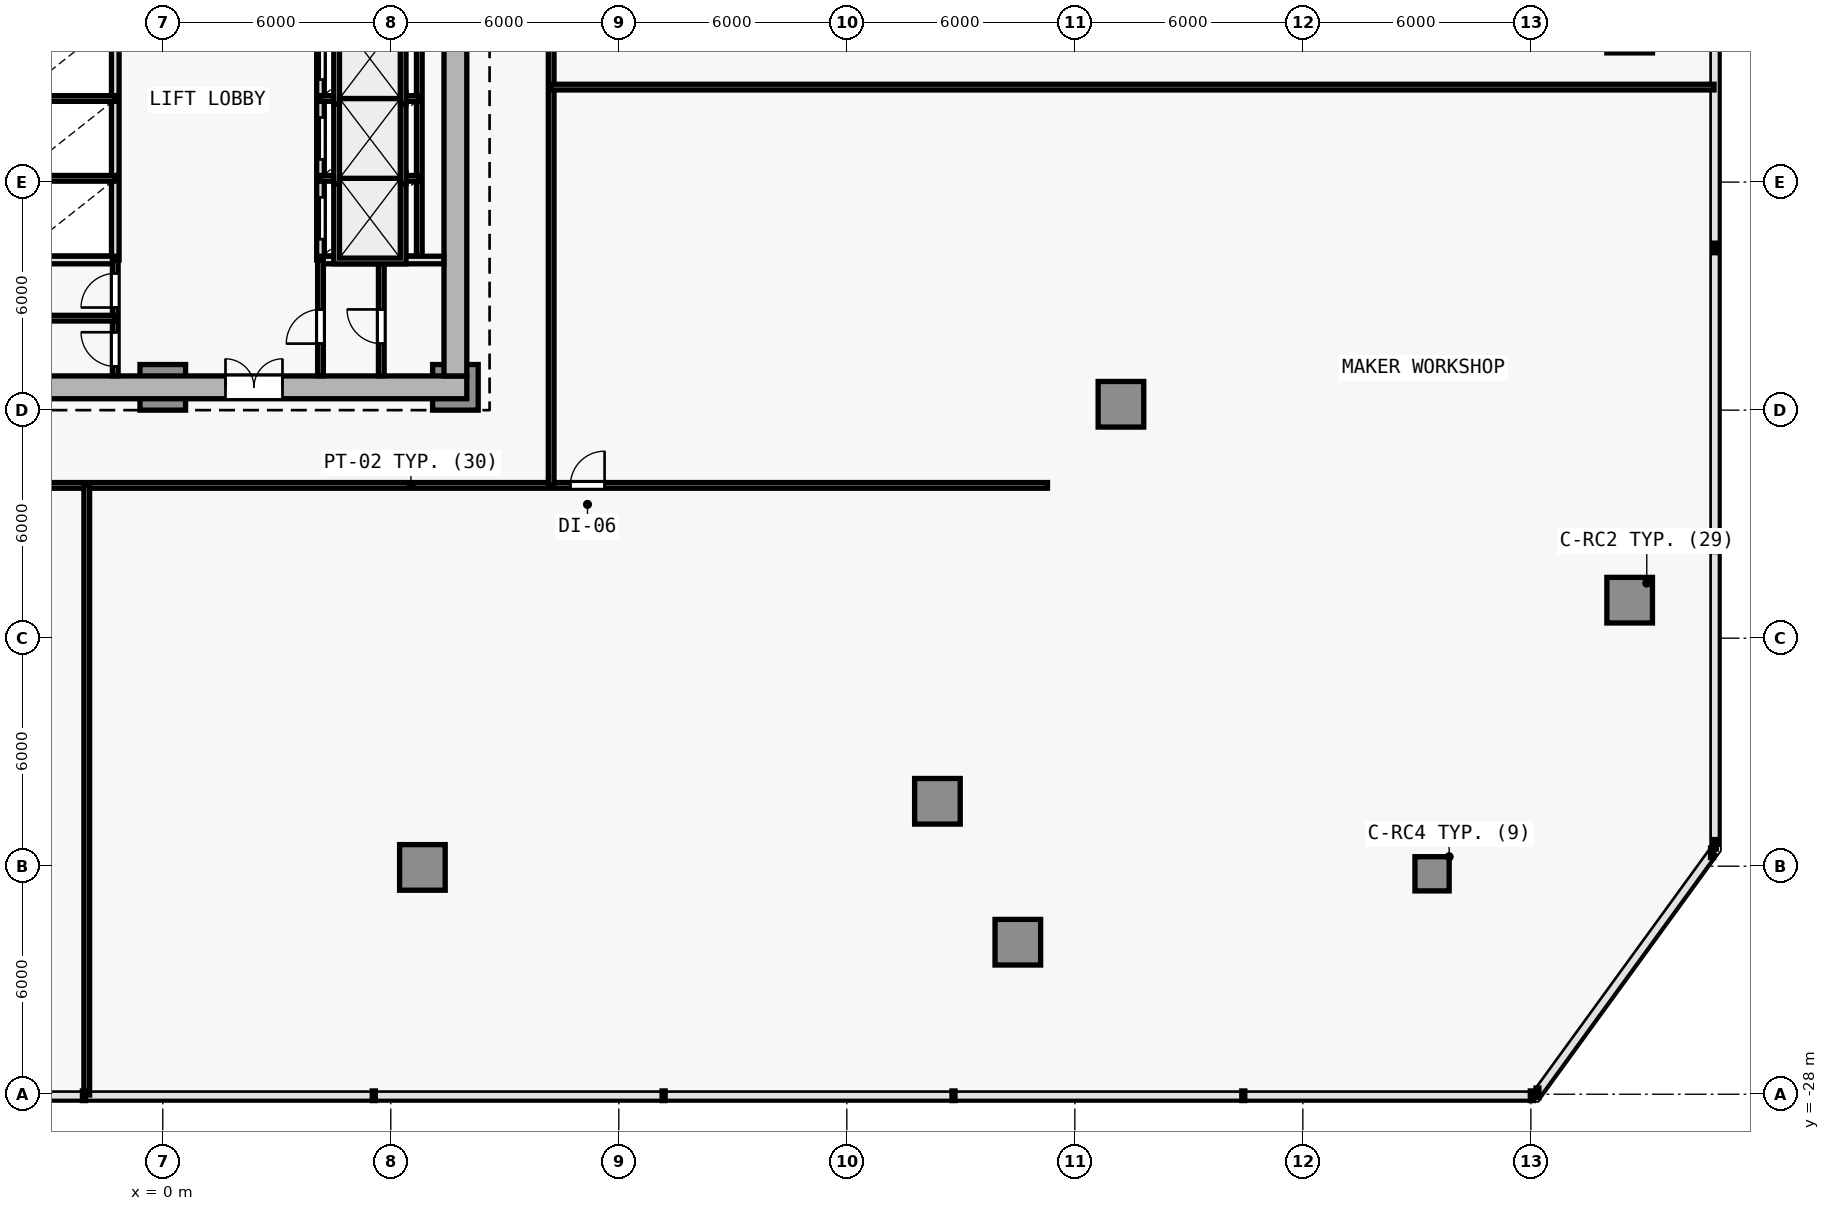
"""IFC4 building model, lengths in metres.
Left out: names, types, materials, properties, quantities, classifications, styles, units other than length and angle.
Written with IfcOpenShell. Run it as: python <this file> out.ifc"""

import sys

from ifc_helpers import new_model, si_unit, direction, frame, frame_2d, origin, origin_2d, place, context, subcontext, project, spatial, rectangle, extrude, element, fill, save


model = new_model("IFC4")
c1 = context("Model", 3, precision=1e-05, world=origin(), true_north=direction((0.0, 1.0)))
c2 = subcontext(c1, "Body", "Model", "MODEL_VIEW")
j1 = project(units=[si_unit("LENGTHUNIT", "METRE"), si_unit("PLANEANGLEUNIT", "RADIAN")], contexts=[c1])
p1 = place(None, origin())
s1 = spatial("IfcSite", under=j1, at=p1, CompositionType="ELEMENT")
p2 = place(p1, origin())
s2 = spatial("IfcBuilding", under=s1, at=p2, CompositionType="ELEMENT")
p3 = place(p2, frame((0.0, 0.0, 5.0)))
s3 = spatial("IfcBuildingStorey", under=s2, at=p3, CompositionType="ELEMENT", Elevation=5.0)
for number, where, z_axis, x_axis in (
    (1, (7.7, -9.4, 0.0), (0.0, 0.0, 1.0), (1.0, 0.0, 0.0)),
    (2, (0.0, -9.4, 0.0), (0.0, 0.0, 1.0), (1.0, 0.0, 0.0)),
    (3, (38.6, -15.0, 0.0), (0.0, 0.0, 1.0), (1.0, 0.0, 0.0)),
    (4, (38.6, 0.0, 0.0), (0.0, 0.0, 1.0), (1.0, 0.0, 0.0)),
    (5, (22.5, -24.0, 0.0), (0.0, 0.0, 1.0), (1.0, 0.0, 0.0)),
    (6, (6.832, -22.032, 0.0), (0.0, 0.0, 1.0), (1.0, 0.0, 0.0)),
    (7, (20.384, -20.292, 0.0), (0.0, 0.0, 1.0), (1.0, 0.0, 0.0)),
    (8, (25.213, -9.845, 0.0), (0.0, 0.0, 1.0), (1.0, 0.0, 0.0)),
):
    element("IfcColumn", number, at=place(p3, frame(where, z_axis=z_axis, x_axis=x_axis)), inside=s3, PredefinedType="COLUMN", context=c2, shape_type="SweptSolid", body=[
        extrude(rectangle(XDim=1.2, YDim=1.2, at=origin_2d()), origin(), (0.0, 0.0, 1.0), 4.2),
    ])
p4 = place(p3, frame((33.4, -22.2, 0.0), z_axis=(0.0, 0.0, 1.0), x_axis=(1.0, 0.0, 0.0)))
e9 = element("IfcColumn", 9, at=p4, inside=s3, PredefinedType="COLUMN", context=c2, shape_type="SweptSolid", body=[
    extrude(rectangle(XDim=0.9, YDim=0.9, at=origin_2d()), origin(), (0.0, 0.0, 1.0), 4.2),
])
p5 = place(p3, frame((-8.0, -9.4, 0.0), z_axis=(0.0, 0.0, 1.0), x_axis=(1.0, 0.0, 0.0)))
e10 = element("IfcWall", 10, at=p5, inside=s3, PredefinedType="SHEAR", context=c2, shape_type="SweptSolid", body=[
    extrude(rectangle(XDim=16.0, YDim=0.6, at=frame_2d((8.0, 0.0))), origin(), (0.0, 0.0, 1.0), 3.92),
])
p6 = place(p5, frame((9.65, 0.0, 0.0)))
e11 = element("IfcOpeningElement", 11, at=p6, cuts=e10, PredefinedType="OPENING", context=c2, shape_type="SweptSolid", body=[
    extrude(rectangle(XDim=1.5, YDim=2.2, at=frame_2d((0.75, 1.1))), frame((0.0, 0.31, 0.0), z_axis=(0.0, -1.0, 0.0), x_axis=(1.0, 0.0, 0.0)), (0.0, 0.0, 1.0), 0.62),
])
p7 = place(p3, frame((7.7, 9.9, 0.0), z_axis=(0.0, 0.0, 1.0), x_axis=(0.0, -1.0, 0.0)))
e12 = element("IfcWall", 12, at=p7, inside=s3, PredefinedType="SHEAR", context=c2, shape_type="SweptSolid", body=[
    extrude(rectangle(XDim=19.0, YDim=0.6, at=frame_2d((9.5, 0.0))), origin(), (0.0, 0.0, 1.0), 3.92),
])
p8 = place(p3, frame((4.15, -6.05, 0.0), z_axis=(0.0, 0.0, 1.0), x_axis=(0.0, 1.0, 0.0)))
e13 = element("IfcWall", 13, at=p8, inside=s3, PredefinedType="SOLIDWALL", context=c2, shape_type="SweptSolid", body=[
    extrude(rectangle(XDim=8.7, YDim=0.2, at=frame_2d((4.35, 0.0))), origin(), (0.0, 0.0, 1.0), 3.92),
])
p9 = place(p8, frame((0.55, 0.0, 0.0)))
e14 = element("IfcOpeningElement", 14, at=p9, cuts=e13, PredefinedType="OPENING", context=c2, shape_type="SweptSolid", body=[
    extrude(rectangle(XDim=1.1, YDim=2.15, at=frame_2d((0.55, 1.075))), frame((0.0, 0.11, 0.0), z_axis=(0.0, -1.0, 0.0), x_axis=(1.0, 0.0, 0.0)), (0.0, 0.0, 1.0), 0.22),
])
p10 = place(p8, frame((2.65, 0.0, 0.0)))
e15 = element("IfcOpeningElement", 15, at=p10, cuts=e13, PredefinedType="OPENING", context=c2, shape_type="SweptSolid", body=[
    extrude(rectangle(XDim=1.1, YDim=2.15, at=frame_2d((0.55, 1.075))), frame((0.0, 0.11, 0.0), z_axis=(0.0, -1.0, 0.0), x_axis=(1.0, 0.0, 0.0)), (0.0, 0.0, 1.0), 0.22),
])
p11 = place(p8, frame((4.75, 0.0, 0.0)))
e16 = element("IfcOpeningElement", 16, at=p11, cuts=e13, PredefinedType="OPENING", context=c2, shape_type="SweptSolid", body=[
    extrude(rectangle(XDim=1.1, YDim=2.15, at=frame_2d((0.55, 1.075))), frame((0.0, 0.11, 0.0), z_axis=(0.0, -1.0, 0.0), x_axis=(1.0, 0.0, 0.0)), (0.0, 0.0, 1.0), 0.22),
])
p12 = place(p8, frame((6.85, 0.0, 0.0)))
e17 = element("IfcOpeningElement", 17, at=p12, cuts=e13, PredefinedType="OPENING", context=c2, shape_type="SweptSolid", body=[
    extrude(rectangle(XDim=1.1, YDim=2.15, at=frame_2d((0.55, 1.075))), frame((0.0, 0.11, 0.0), z_axis=(0.0, -1.0, 0.0), x_axis=(1.0, 0.0, 0.0)), (0.0, 0.0, 1.0), 0.22),
])
p13 = place(p3, frame((6.75, -6.05, 0.0), z_axis=(0.0, 0.0, 1.0), x_axis=(0.0, 1.0, 0.0)))
e18 = element("IfcWall", 18, at=p13, inside=s3, PredefinedType="PARTITIONING", context=c2, shape_type="SweptSolid", body=[
    extrude(rectangle(XDim=8.7, YDim=0.15, at=frame_2d((4.35, 0.0))), origin(), (0.0, 0.0, 1.0), 3.92),
])
for number, where, z_axis, x_axis in (
    (19, (4.15, -3.9, 0.0), (0.0, 0.0, 1.0), (1.0, 0.0, 0.0)),
    (20, (4.15, -1.8, 0.0), (0.0, 0.0, 1.0), (1.0, 0.0, 0.0)),
):
    element("IfcWall", number, at=place(p3, frame(where, z_axis=z_axis, x_axis=x_axis)), inside=s3, PredefinedType="PARTITIONING", context=c2, shape_type="SweptSolid", body=[
        extrude(rectangle(XDim=2.6, YDim=0.15, at=frame_2d((1.3, 0.0))), origin(), (0.0, 0.0, 1.0), 3.92),
    ])
p14 = place(p3, frame((-1.25, -6.05, 0.0), z_axis=(0.0, 0.0, 1.0), x_axis=(0.0, 1.0, 0.0)))
e21 = element("IfcWall", 21, at=p14, inside=s3, PredefinedType="SOLIDWALL", context=c2, shape_type="SweptSolid", body=[
    extrude(rectangle(XDim=8.7, YDim=0.2, at=frame_2d((4.35, 0.0))), origin(), (0.0, 0.0, 1.0), 3.92),
])
for number, where, z_axis, x_axis in (
    (22, (-4.15, -3.9, 0.0), (0.0, 0.0, 1.0), (1.0, 0.0, 0.0)),
    (23, (-4.15, -1.8, 0.0), (0.0, 0.0, 1.0), (1.0, 0.0, 0.0)),
):
    element("IfcWall", number, at=place(p3, frame(where, z_axis=z_axis, x_axis=x_axis)), inside=s3, PredefinedType="PARTITIONING", context=c2, shape_type="SweptSolid", body=[
        extrude(rectangle(XDim=2.9, YDim=0.15, at=frame_2d((1.45, 0.0))), origin(), (0.0, 0.0, 1.0), 3.92),
    ])
p15 = place(p3, frame((-4.04, -6.05, 0.0), z_axis=(0.0, 0.0, 1.0), x_axis=(1.0, 0.0, 0.0)))
e24 = element("IfcWall", 24, at=p15, inside=s3, PredefinedType="SOLIDWALL", context=c2, shape_type="SweptSolid", body=[
    extrude(rectangle(XDim=2.79, YDim=0.2, at=frame_2d((1.395, 0.0))), origin(), (0.0, 0.0, 1.0), 3.92),
])
p16 = place(p3, frame((4.15, -6.05, 0.0), z_axis=(0.0, 0.0, 1.0), x_axis=(1.0, 0.0, 0.0)))
e25 = element("IfcWall", 25, at=p16, inside=s3, PredefinedType="SOLIDWALL", context=c2, shape_type="SweptSolid", body=[
    extrude(rectangle(XDim=3.245, YDim=0.2, at=frame_2d((1.623, 0.0))), origin(), (0.0, 0.0, 1.0), 3.92),
])
p17 = place(p3, frame((-1.25, -9.095, 0.0), z_axis=(0.0, 0.0, 1.0), x_axis=(0.0, 1.0, 0.0)))
e26 = element("IfcWall", 26, at=p17, inside=s3, PredefinedType="PARTITIONING", context=c2, shape_type="SweptSolid", body=[
    extrude(rectangle(XDim=3.045, YDim=0.15, at=frame_2d((1.522, 0.0))), origin(), (0.0, 0.0, 1.0), 3.92),
])
p18 = place(p17, frame((1.795, 0.0, 0.0)))
e27 = element("IfcOpeningElement", 27, at=p18, cuts=e26, PredefinedType="OPENING", context=c2, shape_type="SweptSolid", body=[
    extrude(rectangle(XDim=0.9, YDim=2.1, at=frame_2d((0.45, 1.05))), frame((0.0, 0.085, 0.0), z_axis=(0.0, -1.0, 0.0), x_axis=(1.0, 0.0, 0.0)), (0.0, 0.0, 1.0), 0.17),
])
p19 = place(p17, frame((0.245, 0.0, 0.0)))
e28 = element("IfcOpeningElement", 28, at=p19, cuts=e26, PredefinedType="OPENING", context=c2, shape_type="SweptSolid", body=[
    extrude(rectangle(XDim=0.9, YDim=2.1, at=frame_2d((0.45, 1.05))), frame((0.0, 0.085, 0.0), z_axis=(0.0, -1.0, 0.0), x_axis=(1.0, 0.0, 0.0)), (0.0, 0.0, 1.0), 0.17),
])
p20 = place(p3, frame((4.15, -9.095, 0.0), z_axis=(0.0, 0.0, 1.0), x_axis=(0.0, 1.0, 0.0)))
e29 = element("IfcWall", 29, at=p20, inside=s3, PredefinedType="PARTITIONING", context=c2, shape_type="SweptSolid", body=[
    extrude(rectangle(XDim=3.045, YDim=0.15, at=frame_2d((1.522, 0.0))), origin(), (0.0, 0.0, 1.0), 3.92),
])
p21 = place(p20, frame((0.845, 0.0, 0.0)))
e30 = element("IfcOpeningElement", 30, at=p21, cuts=e29, PredefinedType="OPENING", context=c2, shape_type="SweptSolid", body=[
    extrude(rectangle(XDim=0.9, YDim=2.1, at=frame_2d((0.45, 1.05))), frame((0.0, 0.085, 0.0), z_axis=(0.0, -1.0, 0.0), x_axis=(1.0, 0.0, 0.0)), (0.0, 0.0, 1.0), 0.17),
])
p22 = place(p3, frame((-7.395, -7.58, 0.0), z_axis=(0.0, 0.0, 1.0), x_axis=(1.0, 0.0, 0.0)))
e31 = element("IfcWall", 31, at=p22, inside=s3, PredefinedType="PARTITIONING", context=c2, shape_type="SweptSolid", body=[
    extrude(rectangle(XDim=6.145, YDim=0.15, at=frame_2d((3.073, 0.0))), origin(), (0.0, 0.0, 1.0), 3.92),
])
p23 = place(p3, frame((5.75, -9.095, 0.0), z_axis=(0.0, 0.0, 1.0), x_axis=(0.0, 1.0, 0.0)))
e32 = element("IfcWall", 32, at=p23, inside=s3, PredefinedType="PARTITIONING", context=c2, shape_type="SweptSolid", body=[
    extrude(rectangle(XDim=3.045, YDim=0.15, at=frame_2d((1.522, 0.0))), origin(), (0.0, 0.0, 1.0), 3.92),
])
p24 = place(p23, frame((0.845, 0.0, 0.0)))
e33 = element("IfcOpeningElement", 33, at=p24, cuts=e32, PredefinedType="OPENING", context=c2, shape_type="SweptSolid", body=[
    extrude(rectangle(XDim=0.9, YDim=2.1, at=frame_2d((0.45, 1.05))), frame((0.0, 0.085, 0.0), z_axis=(0.0, -1.0, 0.0), x_axis=(1.0, 0.0, 0.0)), (0.0, 0.0, 1.0), 0.17),
])
p25 = place(p3, frame((-10.22, -11.98, 0.0), z_axis=(0.0, 0.0, 1.0), x_axis=(1.0, 0.0, 0.0)))
e34 = element("IfcWall", 34, at=p25, inside=s3, PredefinedType="PARTITIONING", context=c2, shape_type="SweptSolid", body=[
    extrude(rectangle(XDim=33.5, YDim=0.15, at=frame_2d((16.75, 0.0))), origin(), (0.0, 0.0, 1.0), 3.195),
])
p26 = place(p25, frame((20.946, 0.0, 0.0)))
e35 = element("IfcOpeningElement", 35, at=p26, cuts=e34, PredefinedType="OPENING", context=c2, shape_type="SweptSolid", body=[
    extrude(rectangle(XDim=0.9, YDim=2.1, at=frame_2d((0.45, 1.05))), frame((0.0, 0.085, 0.0), z_axis=(0.0, -1.0, 0.0), x_axis=(1.0, 0.0, 0.0)), (0.0, 0.0, 1.0), 0.17),
])
p27 = place(p3, frame((10.22, -11.98, 0.0), z_axis=(0.0, 0.0, 1.0), x_axis=(0.0, 1.0, 0.0)))
e36 = element("IfcWall", 36, at=p27, inside=s3, PredefinedType="PARTITIONING", context=c2, shape_type="SweptSolid", body=[
    extrude(rectangle(XDim=18.1, YDim=0.15, at=frame_2d((9.05, 0.0))), origin(), (0.0, 0.0, 1.0), 3.195),
])
p28 = place(p3, frame((-2.0, -28.02, 0.0), z_axis=(0.0, 0.0, 1.0), x_axis=(0.0, 1.0, 0.0)))
e37 = element("IfcWall", 37, at=p28, inside=s3, PredefinedType="PARTITIONING", context=c2, shape_type="SweptSolid", body=[
    extrude(rectangle(XDim=16.04, YDim=0.15, at=frame_2d((8.02, 0.0))), origin(), (0.0, 0.0, 1.0), 3.195),
])
p29 = place(p3, frame((10.22, -1.5, 0.0), z_axis=(0.0, 0.0, 1.0), x_axis=(1.0, 0.0, 0.0)))
e38 = element("IfcWall", 38, at=p29, inside=s3, PredefinedType="PARTITIONING", context=c2, shape_type="SweptSolid", body=[
    extrude(rectangle(XDim=30.6, YDim=0.15, at=frame_2d((15.3, 0.0))), origin(), (0.0, 0.0, 1.0), 3.305),
])
p30 = place(p6, origin())
e39 = element("IfcDoor", 39, at=p30, inside=s3, OperationType="DOUBLE_DOOR_SINGLE_SWING", PredefinedType="DOOR", context=c2, shape_type="SweptSolid", body=[
    extrude(rectangle(XDim=1.5, YDim=2.2, at=frame_2d((0.75, 1.1))), frame((0.0, 0.025, 0.0), z_axis=(0.0, -1.0, 0.0), x_axis=(1.0, 0.0, 0.0)), (0.0, 0.0, 1.0), 0.05),
])
fill(e11, e39)
p31 = place(p9, origin())
e40 = element("IfcDoor", 40, at=p31, inside=s3, OperationType="DOUBLE_DOOR_SLIDING", PredefinedType="DOOR", context=c2, shape_type="SweptSolid", body=[
    extrude(rectangle(XDim=1.1, YDim=2.15, at=frame_2d((0.55, 1.075))), frame((0.0, 0.025, 0.0), z_axis=(0.0, -1.0, 0.0), x_axis=(1.0, 0.0, 0.0)), (0.0, 0.0, 1.0), 0.05),
])
fill(e14, e40)
p32 = place(p10, origin())
e41 = element("IfcDoor", 41, at=p32, inside=s3, OperationType="DOUBLE_DOOR_SLIDING", PredefinedType="DOOR", context=c2, shape_type="SweptSolid", body=[
    extrude(rectangle(XDim=1.1, YDim=2.15, at=frame_2d((0.55, 1.075))), frame((0.0, 0.025, 0.0), z_axis=(0.0, -1.0, 0.0), x_axis=(1.0, 0.0, 0.0)), (0.0, 0.0, 1.0), 0.05),
])
fill(e15, e41)
p33 = place(p11, origin())
e42 = element("IfcDoor", 42, at=p33, inside=s3, OperationType="DOUBLE_DOOR_SLIDING", PredefinedType="DOOR", context=c2, shape_type="SweptSolid", body=[
    extrude(rectangle(XDim=1.1, YDim=2.15, at=frame_2d((0.55, 1.075))), frame((0.0, 0.025, 0.0), z_axis=(0.0, -1.0, 0.0), x_axis=(1.0, 0.0, 0.0)), (0.0, 0.0, 1.0), 0.05),
])
fill(e16, e42)
p34 = place(p18, origin())
e43 = element("IfcDoor", 43, at=p34, inside=s3, OperationType="SINGLE_SWING_LEFT", PredefinedType="DOOR", context=c2, shape_type="SweptSolid", body=[
    extrude(rectangle(XDim=0.9, YDim=2.1, at=frame_2d((0.45, 1.05))), frame((0.0, 0.025, 0.0), z_axis=(0.0, -1.0, 0.0), x_axis=(1.0, 0.0, 0.0)), (0.0, 0.0, 1.0), 0.05),
])
fill(e27, e43)
p35 = place(p19, origin())
e44 = element("IfcDoor", 44, at=p35, inside=s3, OperationType="SINGLE_SWING_RIGHT", PredefinedType="DOOR", context=c2, shape_type="SweptSolid", body=[
    extrude(rectangle(XDim=0.9, YDim=2.1, at=frame_2d((0.45, 1.05))), frame((0.0, 0.025, 0.0), z_axis=(0.0, -1.0, 0.0), x_axis=(1.0, 0.0, 0.0)), (0.0, 0.0, 1.0), 0.05),
])
fill(e28, e44)
p36 = place(p21, origin())
e45 = element("IfcDoor", 45, at=p36, inside=s3, OperationType="SINGLE_SWING_LEFT", PredefinedType="DOOR", context=c2, shape_type="SweptSolid", body=[
    extrude(rectangle(XDim=0.9, YDim=2.1, at=frame_2d((0.45, 1.05))), frame((0.0, 0.025, 0.0), z_axis=(0.0, -1.0, 0.0), x_axis=(1.0, 0.0, 0.0)), (0.0, 0.0, 1.0), 0.05),
])
fill(e30, e45)
p37 = place(p24, origin())
e46 = element("IfcDoor", 46, at=p37, inside=s3, OperationType="SINGLE_SWING_RIGHT", PredefinedType="DOOR", context=c2, shape_type="SweptSolid", body=[
    extrude(rectangle(XDim=0.9, YDim=2.1, at=frame_2d((0.45, 1.05))), frame((0.0, 0.025, 0.0), z_axis=(0.0, -1.0, 0.0), x_axis=(1.0, 0.0, 0.0)), (0.0, 0.0, 1.0), 0.05),
])
fill(e33, e46)
p38 = place(p26, origin())
e47 = element("IfcDoor", 47, at=p38, inside=s3, OperationType="SINGLE_SWING_RIGHT", PredefinedType="DOOR", context=c2, shape_type="SweptSolid", body=[
    extrude(rectangle(XDim=0.9, YDim=2.1, at=frame_2d((0.45, 1.05))), frame((0.0, 0.025, 0.0), z_axis=(0.0, -1.0, 0.0), x_axis=(1.0, 0.0, 0.0)), (0.0, 0.0, 1.0), 0.05),
])
fill(e35, e47)
save(model, sys.argv[1])
